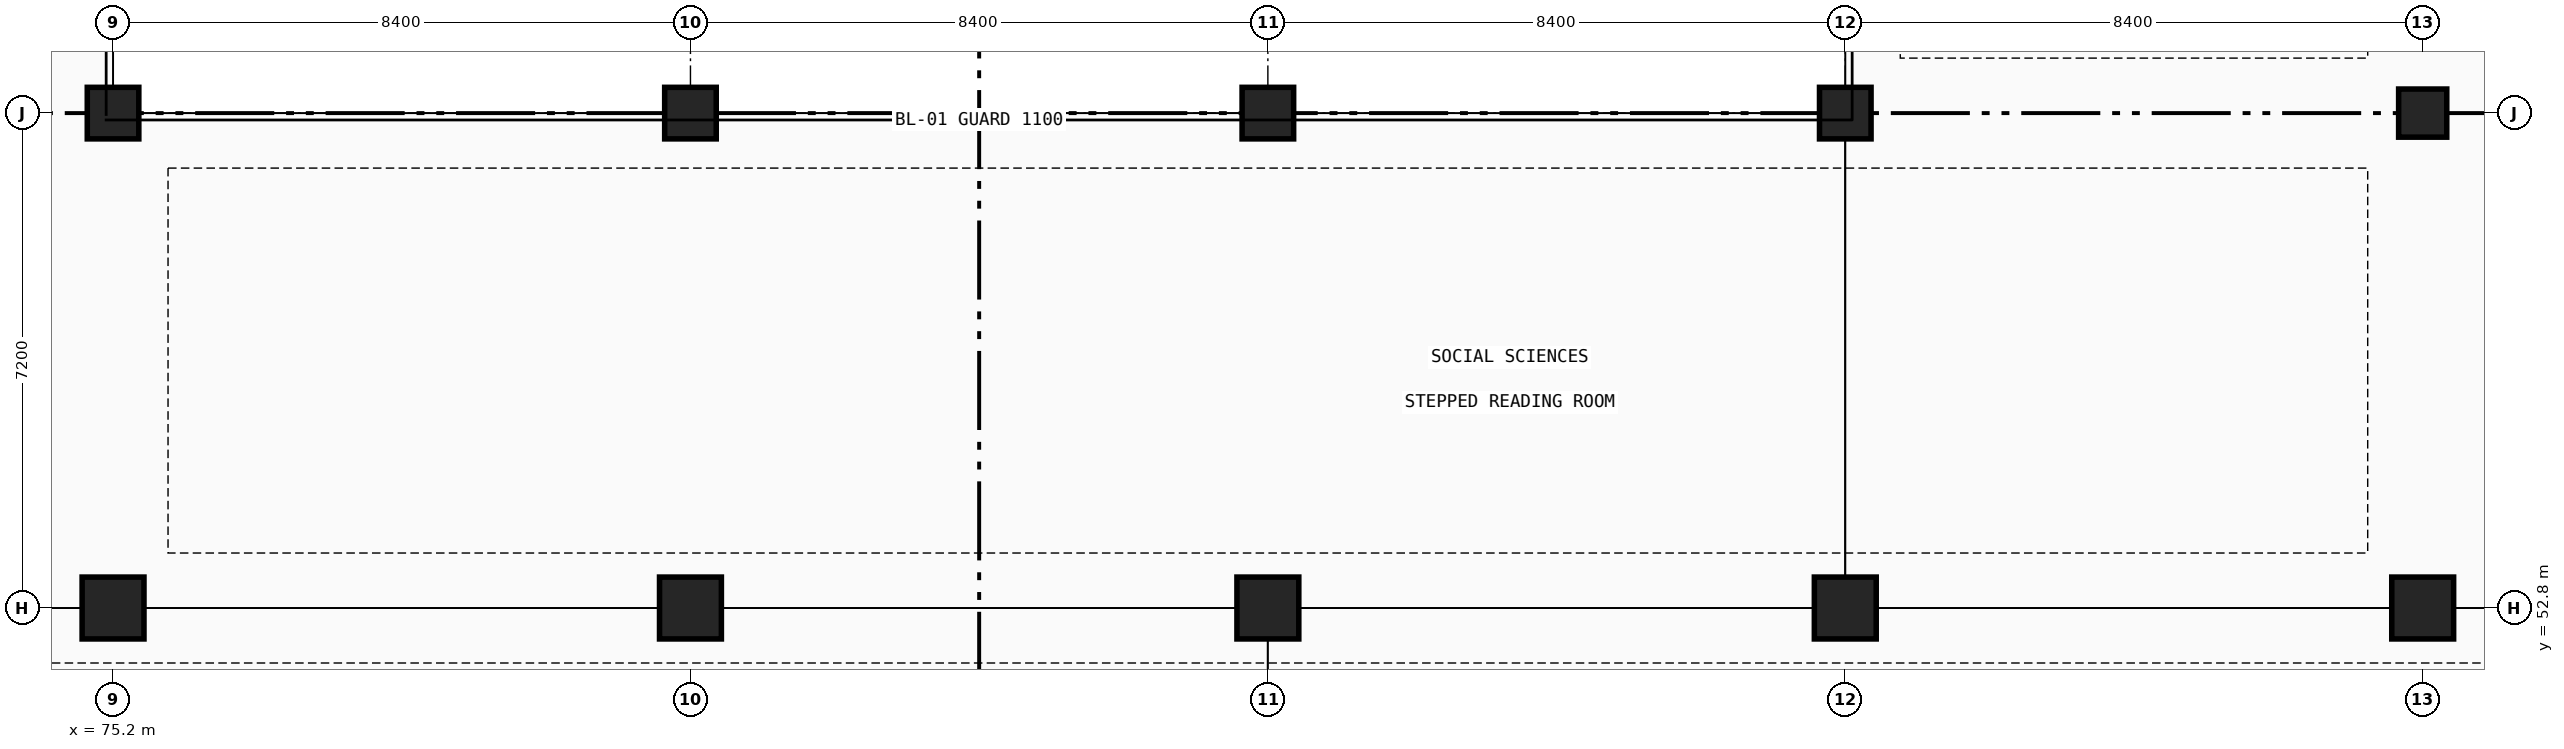
"""IFC4 building model, lengths in metres.
Left out: names, types, materials, properties, quantities, classifications, styles, units other than length and angle.
Written with IfcOpenShell. Run it as: python <this file> out.ifc"""

import sys

from ifc_helpers import new_model, si_unit, direction, frame, origin, origin_2d, place, context, subcontext, project, spatial, rectangle, circle, extrude, element, save


model = new_model("IFC4")
c1 = context("Model", 3, precision=1e-05, world=origin(), true_north=direction((0.0, 1.0)))
c2 = subcontext(c1, "Body", "Model", "MODEL_VIEW")
j1 = project(units=[si_unit("LENGTHUNIT", "METRE"), si_unit("PLANEANGLEUNIT", "RADIAN")], contexts=[c1])
p1 = place(None, origin())
s1 = spatial("IfcSite", under=j1, at=p1, CompositionType="ELEMENT")
p2 = place(p1, origin())
s2 = spatial("IfcBuilding", under=s1, at=p2, CompositionType="ELEMENT")
p3 = place(p2, frame((0.0, 0.0, 9.6)))
s3 = spatial("IfcBuildingStorey", under=s2, at=p3, CompositionType="ELEMENT", Elevation=9.6)
p4 = place(p3, frame((75.2, 52.8, 0.0), z_axis=(0.0, 0.0, 1.0), x_axis=(1.0, 0.0, 0.0)))
e1 = element("IfcColumn", 1, at=p4, inside=s3, PredefinedType="COLUMN", context=c2, shape_type="SweptSolid", body=[
    extrude(rectangle(XDim=0.9, YDim=0.9, at=origin_2d()), origin(), (0.0, 0.0, 1.0), 4.8),
])
p5 = place(p3, frame((75.2, 60.0, 0.0), z_axis=(0.0, 0.0, 1.0), x_axis=(1.0, 0.0, 0.0)))
e2 = element("IfcColumn", 2, at=p5, inside=s3, PredefinedType="COLUMN", context=c2, shape_type="SweptSolid", body=[
    extrude(circle(Radius=0.375, at=origin_2d()), origin(), (0.0, 0.0, 1.0), 4.8),
])
p6 = place(p3, frame((83.6, 52.8, 0.0), z_axis=(0.0, 0.0, 1.0), x_axis=(1.0, 0.0, 0.0)))
e3 = element("IfcColumn", 3, at=p6, inside=s3, PredefinedType="COLUMN", context=c2, shape_type="SweptSolid", body=[
    extrude(rectangle(XDim=0.9, YDim=0.9, at=origin_2d()), origin(), (0.0, 0.0, 1.0), 4.8),
])
p7 = place(p3, frame((83.6, 60.0, 0.0), z_axis=(0.0, 0.0, 1.0), x_axis=(1.0, 0.0, 0.0)))
e4 = element("IfcColumn", 4, at=p7, inside=s3, PredefinedType="COLUMN", context=c2, shape_type="SweptSolid", body=[
    extrude(circle(Radius=0.375, at=origin_2d()), origin(), (0.0, 0.0, 1.0), 4.8),
])
p8 = place(p3, frame((92.0, 52.8, 0.0), z_axis=(0.0, 0.0, 1.0), x_axis=(1.0, 0.0, 0.0)))
e5 = element("IfcColumn", 5, at=p8, inside=s3, PredefinedType="COLUMN", context=c2, shape_type="SweptSolid", body=[
    extrude(rectangle(XDim=0.9, YDim=0.9, at=origin_2d()), origin(), (0.0, 0.0, 1.0), 4.8),
])
p9 = place(p3, frame((92.0, 60.0, 0.0), z_axis=(0.0, 0.0, 1.0), x_axis=(1.0, 0.0, 0.0)))
e6 = element("IfcColumn", 6, at=p9, inside=s3, PredefinedType="COLUMN", context=c2, shape_type="SweptSolid", body=[
    extrude(circle(Radius=0.375, at=origin_2d()), origin(), (0.0, 0.0, 1.0), 4.8),
])
p10 = place(p3, frame((100.4, 52.8, 0.0), z_axis=(0.0, 0.0, 1.0), x_axis=(1.0, 0.0, 0.0)))
e7 = element("IfcColumn", 7, at=p10, inside=s3, PredefinedType="COLUMN", context=c2, shape_type="SweptSolid", body=[
    extrude(rectangle(XDim=0.9, YDim=0.9, at=origin_2d()), origin(), (0.0, 0.0, 1.0), 4.8),
])
p11 = place(p3, frame((100.4, 60.0, 0.0), z_axis=(0.0, 0.0, 1.0), x_axis=(1.0, 0.0, 0.0)))
e8 = element("IfcColumn", 8, at=p11, inside=s3, PredefinedType="COLUMN", context=c2, shape_type="SweptSolid", body=[
    extrude(circle(Radius=0.375, at=origin_2d()), origin(), (0.0, 0.0, 1.0), 4.8),
])
p12 = place(p3, frame((108.8, 52.8, 0.0), z_axis=(0.0, 0.0, 1.0), x_axis=(1.0, 0.0, 0.0)))
e9 = element("IfcColumn", 9, at=p12, inside=s3, PredefinedType="COLUMN", context=c2, shape_type="SweptSolid", body=[
    extrude(rectangle(XDim=0.9, YDim=0.9, at=origin_2d()), origin(), (0.0, 0.0, 1.0), 4.8),
])
p13 = place(p3, frame((108.8, 60.0, 0.0), z_axis=(0.0, 0.0, 1.0), x_axis=(1.0, 0.0, 0.0)))
e10 = element("IfcColumn", 10, at=p13, inside=s3, PredefinedType="COLUMN", context=c2, shape_type="SweptSolid", body=[
    extrude(rectangle(XDim=0.7, YDim=0.7, at=origin_2d()), origin(), (0.0, 0.0, 1.0), 4.8),
])
save(model, sys.argv[1])
